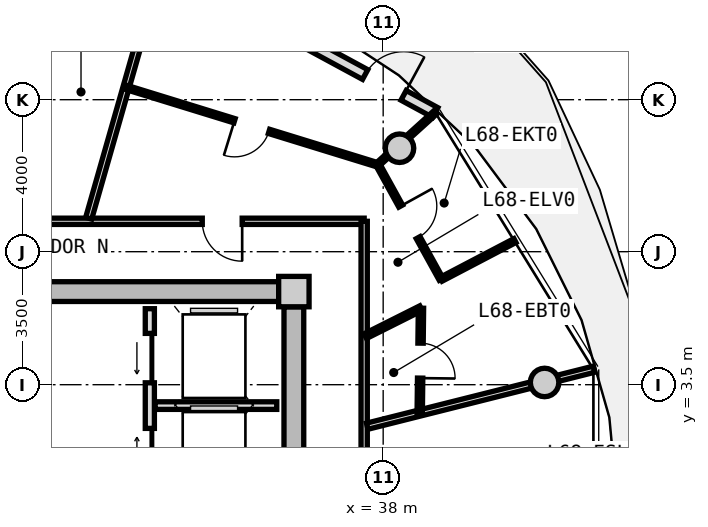
"""IFC4 building model, lengths in metres.
Left out: names, types, materials, properties, quantities, classifications, styles, units other than length and angle.
Written with IfcOpenShell. Run it as: python <this file> out.ifc"""

import sys

from ifc_helpers import new_model, si_unit, direction, frame, frame_2d, origin, origin_2d, place, context, subcontext, project, spatial, rectangle, circle, extrude, source, transform, mapped, element, fill, save


model = new_model("IFC4")
c1 = context("Model", 3, precision=1e-05, world=origin(), true_north=direction((0.0, 1.0)))
c2 = subcontext(c1, "Body", "Model", "MODEL_VIEW")
j1 = project(units=[si_unit("LENGTHUNIT", "METRE"), si_unit("PLANEANGLEUNIT", "RADIAN")], contexts=[c1])
p1 = place(None, origin())
s1 = spatial("IfcSite", under=j1, at=p1, CompositionType="ELEMENT")
p2 = place(p1, origin())
s2 = spatial("IfcBuilding", under=s1, at=p2, CompositionType="ELEMENT")
p3 = place(p2, frame((0.0, 0.0, 220.0)))
s3 = spatial("IfcBuildingStorey", under=s2, at=p3, CompositionType="ELEMENT", Elevation=220.0)
m1 = source(origin(), c2, "Body", "SweptSolid", [
    extrude(rectangle(XDim=0.8, YDim=0.8, at=origin_2d()), origin(), (0.0, 0.0, 1.0), 3.05),
])
p4 = place(p3, frame((35.65, 5.95, 0.0), z_axis=(0.0, 0.0, 1.0), x_axis=(1.0, 0.0, 0.0)))
e1 = element("IfcColumn", 1, at=p4, inside=s3, PredefinedType="COLUMN", context=c2, shape_type="MappedRepresentation", body=[
    mapped(m1, transform((0.0, 0.0, 0.0), x_axis=(1.0, 0.0, 0.0), y_axis=(0.0, 1.0, 0.0), z_axis=(0.0, 0.0, 1.0), scale=1.0)),
])
m2 = source(origin(), c2, "Body", "SweptSolid", [
    extrude(rectangle(XDim=14.5, YDim=0.52, at=frame_2d((7.25, 0.0))), origin(), (0.0, 0.0, 1.0), 2.76),
])
p5 = place(p3, frame((20.75, 5.95, 0.0), z_axis=(0.0, 0.0, 1.0), x_axis=(1.0, 0.0, 0.0)))
e2 = element("IfcWall", 2, at=p5, inside=s3, PredefinedType="SHEAR", context=c2, shape_type="MappedRepresentation", body=[
    mapped(m2, transform((0.0, 0.0, 0.0), x_axis=(1.0, 0.0, 0.0), y_axis=(0.0, 1.0, 0.0), z_axis=(0.0, 0.0, 1.0), scale=1.0)),
])
m3 = source(origin(), c2, "Body", "SweptSolid", [
    extrude(rectangle(XDim=11.1, YDim=0.52, at=frame_2d((5.55, 0.0))), origin(), (0.0, 0.0, 1.0), 2.76),
])
p6 = place(p3, frame((35.65, 5.55, 0.0), z_axis=(0.0, 0.0, 1.0), x_axis=(0.0, -1.0, 0.0)))
e3 = element("IfcWall", 3, at=p6, inside=s3, PredefinedType="SHEAR", context=c2, shape_type="MappedRepresentation", body=[
    mapped(m3, transform((0.0, 0.0, 0.0), x_axis=(1.0, 0.0, 0.0), y_axis=(0.0, 1.0, 0.0), z_axis=(0.0, 0.0, 1.0), scale=1.0)),
])
p7 = place(p6, frame((5.65, 0.0, 0.0)))
e4 = element("IfcOpeningElement", 4, at=p7, cuts=e3, PredefinedType="OPENING", context=c2, shape_type="SweptSolid", body=[
    extrude(rectangle(XDim=1.2, YDim=2.15, at=frame_2d((0.6, 1.075))), frame((0.0, 0.27, 0.0), z_axis=(0.0, -1.0, 0.0), x_axis=(1.0, 0.0, 0.0)), (0.0, 0.0, 1.0), 0.54),
])
m4 = source(origin(), c2, "Body", "SweptSolid", [
    extrude(circle(Radius=0.375, at=origin_2d()), origin(), (0.0, 0.0, 1.0), 3.05),
])
for number, where, z_axis, x_axis in (
    (5, (42.247, 3.559, 0.0), (0.0, 0.0, 1.0), (1.0, 0.0, 0.0)),
    (6, (38.43, 9.723, 0.0), (0.0, 0.0, 1.0), (1.0, 0.0, 0.0)),
):
    element("IfcColumn", number, at=place(p3, frame(where, z_axis=z_axis, x_axis=x_axis)), inside=s3, PredefinedType="COLUMN", context=c2, shape_type="MappedRepresentation", body=[
        mapped(m4, transform((0.0, 0.0, 0.0), x_axis=(1.0, 0.0, 0.0), y_axis=(0.0, 1.0, 0.0), z_axis=(0.0, 0.0, 1.0), scale=1.0)),
    ])
m5 = source(origin(), c2, "Body", "SweptSolid", [
    extrude(rectangle(XDim=8.197, YDim=0.29, at=frame_2d((4.099, 0.0))), origin(), (0.0, 0.0, 1.0), 2.76),
])
p8 = place(p3, frame((32.162, 14.566, 0.0), z_axis=(0.0, 0.0, 1.0), x_axis=(0.879369910001, -0.476139224791, 0.0)))
e7 = element("IfcWall", 7, at=p8, inside=s3, PredefinedType="SOLIDWALL", context=c2, shape_type="MappedRepresentation", body=[
    mapped(m5, transform((0.0, 0.0, 0.0), x_axis=(1.0, 0.0, 0.0), y_axis=(0.0, 1.0, 0.0), z_axis=(0.0, 0.0, 1.0), scale=1.0)),
])
p9 = place(p8, frame((6.1, 0.0, 0.0)))
e8 = element("IfcOpeningElement", 8, at=p9, cuts=e7, PredefinedType="OPENING", context=c2, shape_type="SweptSolid", body=[
    extrude(rectangle(XDim=1.15, YDim=2.25, at=frame_2d((0.575, 1.125))), frame((0.0, 0.155, 0.0), z_axis=(0.0, -1.0, 0.0), x_axis=(1.0, 0.0, 0.0)), (0.0, 0.0, 1.0), 0.31),
])
p10 = place(p8, frame((0.85, 0.0, 0.85)))
e9 = element("IfcOpeningElement", 9, at=p10, cuts=e7, PredefinedType="OPENING", context=c2, shape_type="SweptSolid", body=[
    extrude(rectangle(XDim=1.2, YDim=1.5, at=frame_2d((0.6, 0.75))), frame((0.0, 0.155, 0.0), z_axis=(0.0, -1.0, 0.0), x_axis=(1.0, 0.0, 0.0)), (0.0, 0.0, 1.0), 0.31),
])
m6 = source(origin(), c2, "Body", "SweptSolid", [
    extrude(rectangle(XDim=5.0, YDim=0.24, at=frame_2d((2.5, 0.0))), origin(), (0.0, 0.0, 1.0), 2.745),
])
p11 = place(p3, frame((31.86, 0.5, 0.0), z_axis=(0.0, 0.0, 1.0), x_axis=(0.0, 1.0, 0.0)))
e10 = element("IfcWall", 10, at=p11, inside=s3, PredefinedType="PARTITIONING", context=c2, shape_type="MappedRepresentation", body=[
    mapped(m6, transform((0.0, 0.0, 0.0), x_axis=(1.0, 0.0, 0.0), y_axis=(0.0, 1.0, 0.0), z_axis=(0.0, 0.0, 1.0), scale=1.0)),
])
p12 = place(p11, frame((3.05, 0.0, 0.0)))
e11 = element("IfcOpeningElement", 11, at=p12, cuts=e10, PredefinedType="OPENING", context=c2, shape_type="SweptSolid", body=[
    extrude(rectangle(XDim=1.3, YDim=2.2, at=frame_2d((0.65, 1.1))), frame((0.0, 0.13, 0.0), z_axis=(0.0, -1.0, 0.0), x_axis=(1.0, 0.0, 0.0)), (0.0, 0.0, 1.0), 0.26),
])
p13 = place(p11, frame((0.55, 0.0, 0.0)))
e12 = element("IfcOpeningElement", 12, at=p13, cuts=e10, PredefinedType="OPENING", context=c2, shape_type="SweptSolid", body=[
    extrude(rectangle(XDim=1.3, YDim=2.2, at=frame_2d((0.65, 1.1))), frame((0.0, 0.13, 0.0), z_axis=(0.0, -1.0, 0.0), x_axis=(1.0, 0.0, 0.0)), (0.0, 0.0, 1.0), 0.26),
])
m7 = source(origin(), c2, "Body", "SweptSolid", [
    extrude(rectangle(XDim=3.2, YDim=0.2, at=frame_2d((1.6, 0.0))), origin(), (0.0, 0.0, 1.0), 2.745),
])
p14 = place(p3, frame((32.0, 2.95, 0.0), z_axis=(0.0, 0.0, 1.0), x_axis=(1.0, 0.0, 0.0)))
e13 = element("IfcWall", 13, at=p14, inside=s3, PredefinedType="PARTITIONING", context=c2, shape_type="MappedRepresentation", body=[
    mapped(m7, transform((0.0, 0.0, 0.0), x_axis=(1.0, 0.0, 0.0), y_axis=(0.0, 1.0, 0.0), z_axis=(0.0, 0.0, 1.0), scale=1.0)),
])
m8 = source(origin(), c2, "Body", "SweptSolid", [
    extrude(rectangle(XDim=8.58, YDim=0.165, at=frame_2d((4.29, 0.0))), origin(), (0.0, 0.0, 1.0), 2.745),
])
p15 = place(p3, frame((28.92, 7.8, 0.0), z_axis=(0.0, 0.0, 1.0), x_axis=(1.0, 0.0, 0.0)))
e14 = element("IfcWall", 14, at=p15, inside=s3, PredefinedType="PARTITIONING", context=c2, shape_type="MappedRepresentation", body=[
    mapped(m8, transform((0.0, 0.0, 0.0), x_axis=(1.0, 0.0, 0.0), y_axis=(0.0, 1.0, 0.0), z_axis=(0.0, 0.0, 1.0), scale=1.0)),
])
p16 = place(p15, frame((4.32, 0.0, 0.0)))
e15 = element("IfcOpeningElement", 15, at=p16, cuts=e14, PredefinedType="OPENING", context=c2, shape_type="SweptSolid", body=[
    extrude(rectangle(XDim=1.05, YDim=2.15, at=frame_2d((0.525, 1.075))), frame((0.0, 0.093, 0.0), z_axis=(0.0, -1.0, 0.0), x_axis=(1.0, 0.0, 0.0)), (0.0, 0.0, 1.0), 0.185),
])
m9 = source(origin(), c2, "Body", "SweptSolid", [
    extrude(rectangle(XDim=6.88, YDim=0.165, at=frame_2d((3.44, 0.0))), origin(), (0.0, 0.0, 1.0), 2.745),
])
p17 = place(p3, frame((37.5, 7.8, 0.0), z_axis=(0.0, 0.0, 1.0), x_axis=(0.0, -1.0, 0.0)))
e16 = element("IfcWall", 16, at=p17, inside=s3, PredefinedType="PARTITIONING", context=c2, shape_type="MappedRepresentation", body=[
    mapped(m9, transform((0.0, 0.0, 0.0), x_axis=(1.0, 0.0, 0.0), y_axis=(0.0, 1.0, 0.0), z_axis=(0.0, 0.0, 1.0), scale=1.0)),
])
m10 = source(origin(), c2, "Body", "SweptSolid", [
    extrude(rectangle(XDim=6.974, YDim=0.165, at=frame_2d((3.487, 0.0))), origin(), (0.0, 0.0, 1.0), 2.345),
])
p18 = place(p3, frame((30.251, 7.88, 0.0), z_axis=(0.0, 0.0, 1.0), x_axis=(0.274707256801, 0.961527910703, 0.0)))
e17 = element("IfcWall", 17, at=p18, inside=s3, PredefinedType="PARTITIONING", context=c2, shape_type="MappedRepresentation", body=[
    mapped(m10, transform((0.0, 0.0, 0.0), x_axis=(1.0, 0.0, 0.0), y_axis=(0.0, 1.0, 0.0), z_axis=(0.0, 0.0, 1.0), scale=1.0)),
])
m11 = source(origin(), c2, "Body", "SweptSolid", [
    extrude(rectangle(XDim=6.157, YDim=0.165, at=frame_2d((3.079, 0.0))), origin(), (0.0, 0.0, 1.0), 2.345),
])
p19 = place(p3, frame((37.58, 2.407, 0.0), z_axis=(0.0, 0.0, 1.0), x_axis=(0.969840867184, 0.243738984038, 0.0)))
e18 = element("IfcWall", 18, at=p19, inside=s3, PredefinedType="PARTITIONING", context=c2, shape_type="MappedRepresentation", body=[
    mapped(m11, transform((0.0, 0.0, 0.0), x_axis=(1.0, 0.0, 0.0), y_axis=(0.0, 1.0, 0.0), z_axis=(0.0, 0.0, 1.0), scale=1.0)),
])
m12 = source(origin(), c2, "Body", "SweptSolid", [
    extrude(rectangle(XDim=6.919, YDim=0.115, at=frame_2d((3.459, 0.0))), origin(), (0.0, 0.0, 1.0), 2.745),
])
p20 = place(p3, frame((37.849, 9.287, 0.0), z_axis=(0.0, 0.0, 1.0), x_axis=(-0.955678249072, 0.294413118341, 0.0)))
e19 = element("IfcWall", 19, at=p20, inside=s3, PredefinedType="PARTITIONING", context=c2, shape_type="MappedRepresentation", body=[
    mapped(m12, transform((0.0, 0.0, 0.0), x_axis=(1.0, 0.0, 0.0), y_axis=(0.0, 1.0, 0.0), z_axis=(0.0, 0.0, 1.0), scale=1.0)),
])
p21 = place(p20, frame((2.985, 0.0, 0.0)))
e20 = element("IfcOpeningElement", 20, at=p21, cuts=e19, PredefinedType="OPENING", context=c2, shape_type="SweptSolid", body=[
    extrude(rectangle(XDim=0.95, YDim=2.1, at=frame_2d((0.475, 1.05))), frame((0.0, 0.067, 0.0), z_axis=(0.0, -1.0, 0.0), x_axis=(1.0, 0.0, 0.0)), (0.0, 0.0, 1.0), 0.135),
])
m13 = source(origin(), c2, "Body", "SweptSolid", [
    extrude(rectangle(XDim=2.072, YDim=0.115, at=frame_2d((1.036, 0.0))), origin(), (0.0, 0.0, 1.0), 2.385),
])
p22 = place(p3, frame((37.849, 9.287, 0.0), z_axis=(0.0, 0.0, 1.0), x_axis=(0.741410125356, 0.671052178314, 0.0)))
e21 = element("IfcWall", 21, at=p22, inside=s3, PredefinedType="PARTITIONING", context=c2, shape_type="MappedRepresentation", body=[
    mapped(m13, transform((0.0, 0.0, 0.0), x_axis=(1.0, 0.0, 0.0), y_axis=(0.0, 1.0, 0.0), z_axis=(0.0, 0.0, 1.0), scale=1.0)),
])
m14 = source(origin(), c2, "Body", "SweptSolid", [
    extrude(rectangle(XDim=1.638, YDim=0.14, at=frame_2d((0.819, 0.0))), origin(), (0.0, 0.0, 1.0), 2.745),
])
p23 = place(p3, frame((37.53, 4.778, 0.0), z_axis=(0.0, 0.0, 1.0), x_axis=(0.893919977945, 0.448226586707, 0.0)))
e22 = element("IfcWall", 22, at=p23, inside=s3, PredefinedType="PARTITIONING", context=c2, shape_type="MappedRepresentation", body=[
    mapped(m14, transform((0.0, 0.0, 0.0), x_axis=(1.0, 0.0, 0.0), y_axis=(0.0, 1.0, 0.0), z_axis=(0.0, 0.0, 1.0), scale=1.0)),
])
m15 = source(origin(), c2, "Body", "SweptSolid", [
    extrude(rectangle(XDim=2.759, YDim=0.14, at=frame_2d((1.379, 0.0))), origin(), (0.0, 0.0, 1.0), 2.745),
])
p24 = place(p3, frame((38.995, 5.513, 0.0), z_axis=(0.0, 0.0, 1.0), x_axis=(-0.01194710728, -0.999928630767, 0.0)))
e23 = element("IfcWall", 23, at=p24, inside=s3, PredefinedType="PARTITIONING", context=c2, shape_type="MappedRepresentation", body=[
    mapped(m15, transform((0.0, 0.0, 0.0), x_axis=(1.0, 0.0, 0.0), y_axis=(0.0, 1.0, 0.0), z_axis=(0.0, 0.0, 1.0), scale=1.0)),
])
p25 = place(p24, frame((0.919, 0.0, 0.0)))
e24 = element("IfcOpeningElement", 24, at=p25, cuts=e23, PredefinedType="OPENING", context=c2, shape_type="SweptSolid", body=[
    extrude(rectangle(XDim=0.92, YDim=2.1, at=frame_2d((0.46, 1.05))), frame((0.0, 0.08, 0.0), z_axis=(0.0, -1.0, 0.0), x_axis=(1.0, 0.0, 0.0)), (0.0, 0.0, 1.0), 0.16),
])
m16 = source(origin(), c2, "Body", "SweptSolid", [
    extrude(rectangle(XDim=2.193, YDim=0.115, at=frame_2d((1.097, 0.0))), origin(), (0.0, 0.0, 1.0), 2.745),
])
p26 = place(p3, frame((39.525, 6.275, 0.0), z_axis=(0.0, 0.0, 1.0), x_axis=(0.885783595046, 0.464098505435, 0.0)))
e25 = element("IfcWall", 25, at=p26, inside=s3, PredefinedType="PARTITIONING", context=c2, shape_type="MappedRepresentation", body=[
    mapped(m16, transform((0.0, 0.0, 0.0), x_axis=(1.0, 0.0, 0.0), y_axis=(0.0, 1.0, 0.0), z_axis=(0.0, 0.0, 1.0), scale=1.0)),
])
m17 = source(origin(), c2, "Body", "SweptSolid", [
    extrude(rectangle(XDim=3.45, YDim=0.115, at=frame_2d((1.725, 0.0))), origin(), (0.0, 0.0, 1.0), 2.745),
])
p27 = place(p3, frame((39.525, 6.275, 0.0), z_axis=(0.0, 0.0, 1.0), x_axis=(-0.483659007882, 0.875256513312, 0.0)))
e26 = element("IfcWall", 26, at=p27, inside=s3, PredefinedType="PARTITIONING", context=c2, shape_type="MappedRepresentation", body=[
    mapped(m17, transform((0.0, 0.0, 0.0), x_axis=(1.0, 0.0, 0.0), y_axis=(0.0, 1.0, 0.0), z_axis=(0.0, 0.0, 1.0), scale=1.0)),
])
p28 = place(p27, frame((1.25, 0.0, 0.0)))
e27 = element("IfcOpeningElement", 27, at=p28, cuts=e26, PredefinedType="OPENING", context=c2, shape_type="SweptSolid", body=[
    extrude(rectangle(XDim=0.95, YDim=2.1, at=frame_2d((0.475, 1.05))), frame((0.0, 0.067, 0.0), z_axis=(0.0, -1.0, 0.0), x_axis=(1.0, 0.0, 0.0)), (0.0, 0.0, 1.0), 0.135),
])
m18 = source(origin(), c2, "Body", "SweptSolid", [
    extrude(rectangle(XDim=1.15, YDim=2.25, at=frame_2d((0.575, 1.125))), frame((0.0, 0.025, 0.0), z_axis=(0.0, -1.0, 0.0), x_axis=(1.0, 0.0, 0.0)), (0.0, 0.0, 1.0), 0.05),
])
p29 = place(p9, origin())
e28 = element("IfcDoor", 28, at=p29, inside=s3, OperationType="SINGLE_SWING_RIGHT", PredefinedType="DOOR", context=c2, shape_type="MappedRepresentation", body=[
    mapped(m18, transform((0.0, 0.0, 0.0), x_axis=(1.0, 0.0, 0.0), y_axis=(0.0, 1.0, 0.0), z_axis=(0.0, 0.0, 1.0), scale=1.0)),
])
fill(e8, e28)
m19 = source(origin(), c2, "Body", "SweptSolid", [
    extrude(rectangle(XDim=1.3, YDim=2.2, at=frame_2d((0.65, 1.1))), frame((0.0, 0.025, 0.0), z_axis=(0.0, -1.0, 0.0), x_axis=(1.0, 0.0, 0.0)), (0.0, 0.0, 1.0), 0.05),
])
p30 = place(p12, origin())
e29 = element("IfcDoor", 29, at=p30, inside=s3, OperationType="SLIDING_TO_LEFT", PredefinedType="DOOR", context=c2, shape_type="MappedRepresentation", body=[
    mapped(m19, transform((0.0, 0.0, 0.0), x_axis=(1.0, 0.0, 0.0), y_axis=(0.0, 1.0, 0.0), z_axis=(0.0, 0.0, 1.0), scale=1.0)),
])
fill(e11, e29)
p31 = place(p13, origin())
e30 = element("IfcDoor", 30, at=p31, inside=s3, OperationType="SLIDING_TO_RIGHT", PredefinedType="DOOR", context=c2, shape_type="MappedRepresentation", body=[
    mapped(m19, transform((0.0, 0.0, 0.0), x_axis=(1.0, 0.0, 0.0), y_axis=(0.0, 1.0, 0.0), z_axis=(0.0, 0.0, 1.0), scale=1.0)),
])
fill(e12, e30)
m20 = source(origin(), c2, "Body", "SweptSolid", [
    extrude(rectangle(XDim=1.05, YDim=2.15, at=frame_2d((0.525, 1.075))), frame((0.0, 0.025, 0.0), z_axis=(0.0, -1.0, 0.0), x_axis=(1.0, 0.0, 0.0)), (0.0, 0.0, 1.0), 0.05),
])
p32 = place(p16, frame((1.05, 0.0, 0.0), z_axis=(0.0, 0.0, 1.0), x_axis=(-1.0, 0.0, 0.0)))
e31 = element("IfcDoor", 31, at=p32, inside=s3, OperationType="SINGLE_SWING_LEFT", PredefinedType="DOOR", context=c2, shape_type="MappedRepresentation", body=[
    mapped(m20, transform((0.0, 0.0, 0.0), x_axis=(1.0, 0.0, 0.0), y_axis=(0.0, 1.0, 0.0), z_axis=(0.0, 0.0, 1.0), scale=1.0)),
])
fill(e15, e31)
m21 = source(origin(), c2, "Body", "SweptSolid", [
    extrude(rectangle(XDim=0.92, YDim=2.1, at=frame_2d((0.46, 1.05))), frame((0.0, 0.025, 0.0), z_axis=(0.0, -1.0, 0.0), x_axis=(1.0, 0.0, 0.0)), (0.0, 0.0, 1.0), 0.05),
])
p33 = place(p25, origin())
e32 = element("IfcDoor", 32, at=p33, inside=s3, OperationType="SINGLE_SWING_RIGHT", PredefinedType="DOOR", context=c2, shape_type="MappedRepresentation", body=[
    mapped(m21, transform((0.0, 0.0, 0.0), x_axis=(1.0, 0.0, 0.0), y_axis=(0.0, 1.0, 0.0), z_axis=(0.0, 0.0, 1.0), scale=1.0)),
])
fill(e24, e32)
m22 = source(origin(), c2, "Body", "SweptSolid", [
    extrude(rectangle(XDim=0.95, YDim=2.1, at=frame_2d((0.475, 1.05))), frame((0.0, 0.025, 0.0), z_axis=(0.0, -1.0, 0.0), x_axis=(1.0, 0.0, 0.0)), (0.0, 0.0, 1.0), 0.05),
])
p34 = place(p28, frame((0.95, 0.0, 0.0), z_axis=(0.0, 0.0, 1.0), x_axis=(-1.0, 0.0, 0.0)))
e33 = element("IfcDoor", 33, at=p34, inside=s3, OperationType="SINGLE_SWING_LEFT", PredefinedType="DOOR", context=c2, shape_type="MappedRepresentation", body=[
    mapped(m22, transform((0.0, 0.0, 0.0), x_axis=(1.0, 0.0, 0.0), y_axis=(0.0, 1.0, 0.0), z_axis=(0.0, 0.0, 1.0), scale=1.0)),
])
fill(e27, e33)
p35 = place(p21, origin())
e34 = element("IfcDoor", 34, at=p35, inside=s3, OperationType="SINGLE_SWING_RIGHT", PredefinedType="DOOR", context=c2, shape_type="MappedRepresentation", body=[
    mapped(m22, transform((0.0, 0.0, 0.0), x_axis=(1.0, 0.0, 0.0), y_axis=(0.0, 1.0, 0.0), z_axis=(0.0, 0.0, 1.0), scale=1.0)),
])
fill(e20, e34)
save(model, sys.argv[1])
